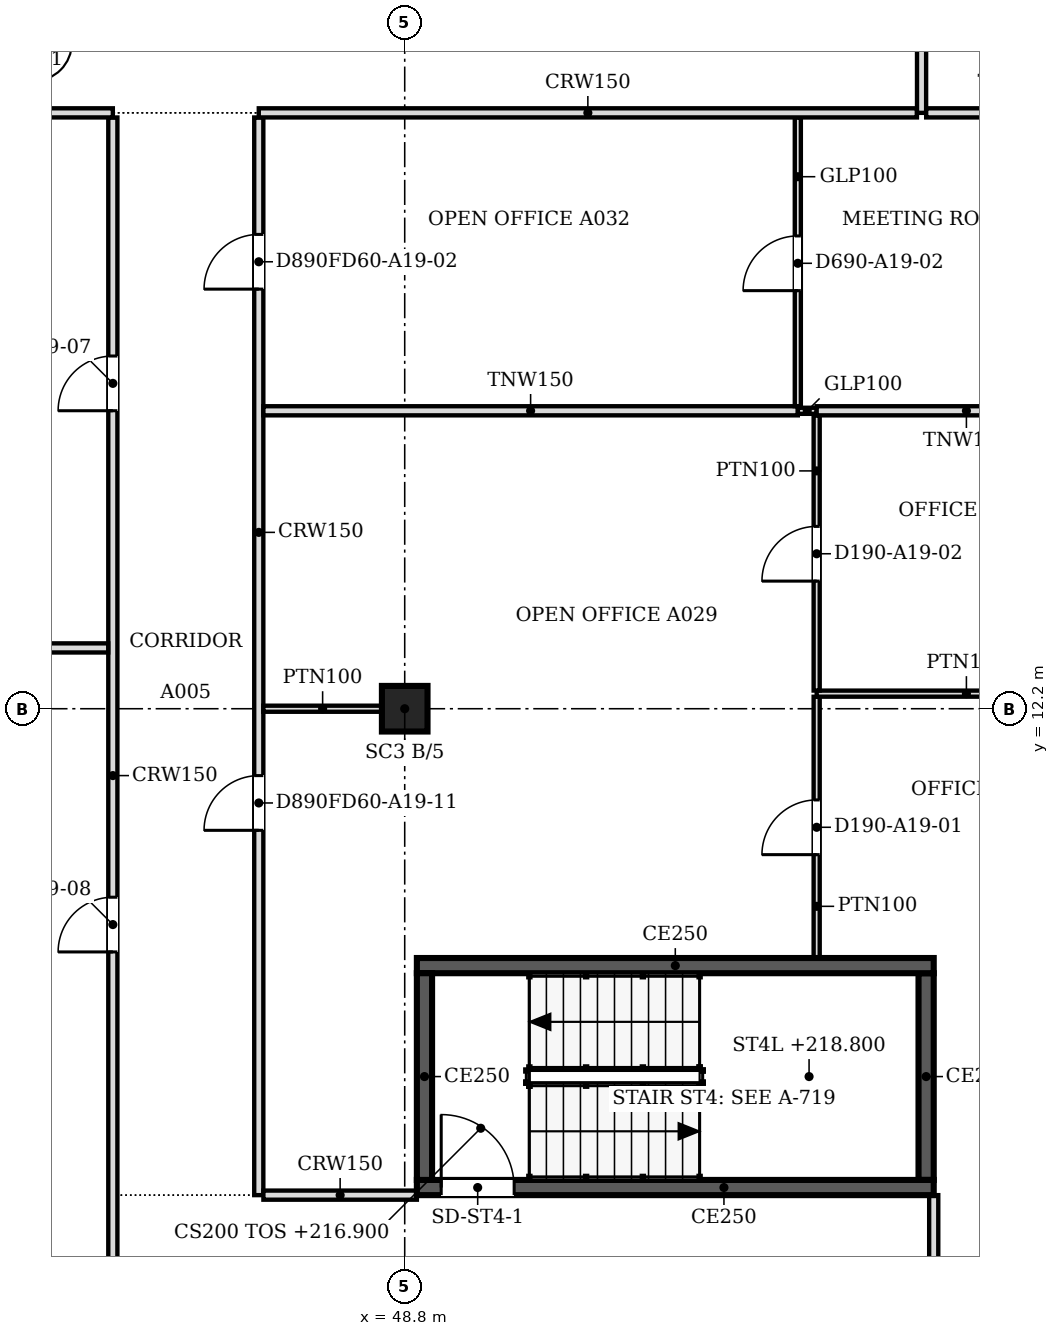
"""IFC4 building model, lengths in metres.
Left out: names, types, materials, properties, quantities, classifications, styles, units other than length and angle.
Written with IfcOpenShell. Run it as: python <this file> out.ifc"""

import sys

from ifc_helpers import new_model, si_unit, direction, frame, frame_2d, origin, origin_2d, place, context, subcontext, project, spatial, polyline, rectangle, outline, extrude, faceted_brep, source, transform, mapped, element, fill, save


model = new_model("IFC4")
c1 = context("Model", 3, precision=1e-05, world=origin(), true_north=direction((0.0, 1.0)))
c2 = subcontext(c1, "Body", "Model", "MODEL_VIEW")
j1 = project(units=[si_unit("LENGTHUNIT", "METRE"), si_unit("PLANEANGLEUNIT", "RADIAN")], contexts=[c1])
p1 = place(None, origin())
s1 = spatial("IfcSite", under=j1, at=p1, CompositionType="ELEMENT")
p2 = place(p1, origin())
s2 = spatial("IfcBuilding", under=s1, at=p2, CompositionType="ELEMENT")
p3 = place(p2, frame((0.0, 0.0, 216.9)))
s3 = spatial("IfcBuildingStorey", under=s2, at=p3, CompositionType="ELEMENT", Elevation=216.9)
p4 = place(p3, frame((48.8, 12.2, 0.0), z_axis=(0.0, 0.0, 1.0), x_axis=(1.0, 0.0, 0.0)))
e1 = element("IfcColumn", 1, at=p4, inside=s3, PredefinedType="COLUMN", context=c2, shape_type="SweptSolid", body=[
    extrude(rectangle(XDim=0.75, YDim=0.75, at=origin_2d()), origin(), (0.0, 0.0, 1.0), 3.6),
])
m1 = source(origin(), c2, "Body", "Brep", [
    faceted_brep([(0.053, -0.25, 0.0), (2.997, -0.25, 3.8), (0.053, -0.25, 7.6), (0.0, -0.25, 7.532), (0.0, -0.25, 0.068), (0.106, 0.25, 7.531), (2.944, 0.25, 3.868), (2.944, 0.25, 3.732), (0.106, 0.25, 0.068), (2.997, 0.0, 3.8), (0.053, 0.0, 0.0), (0.053, 0.0, 7.6)], [[[0, 1, 2, 3, 4]], [[5, 6, 7, 8]], [[8, 7, 9, 1, 0, 10]], [[6, 5, 11, 2, 1, 9]], [[3, 2, 11]], [[10, 0, 4]], [[8, 10, 4, 3, 11, 5]], [[9, 7, 6]]]),
])
p5 = place(p3, frame((57.569, 1.274, -3.8), z_axis=(0.0, 0.0, 1.0), x_axis=(0.707066050402, 0.707147509625, 0.0)))
e2 = element("IfcWall", 2, at=p5, inside=s3, PredefinedType="SOLIDWALL", context=c2, shape_type="MappedRepresentation", body=[
    mapped(m1, transform((0.0, 0.0, 0.0), scale=1.0)),
])
m2 = source(origin(), c2, "Body", "SweptSolid", [
    extrude(outline(polyline([(0.253, 0.666), (2.681, 3.8), (0.253, 6.934), (0.253, 0.666)])), frame((0.0, 0.26, 0.0), z_axis=(0.0, -1.0, 0.0), x_axis=(1.0, 0.0, 0.0)), (0.0, 0.0, 1.0), 0.52),
])
p6 = place(p5, origin())
e3 = element("IfcOpeningElement", 3, at=p6, cuts=e2, PredefinedType="OPENING", context=c2, shape_type="MappedRepresentation", body=[
    mapped(m2, transform((0.0, 0.0, 0.0), scale=1.0)),
])
p7 = place(p2, frame((0.0, 0.0, 220.7)))
s4 = spatial("IfcBuildingStorey", under=s2, at=p7, CompositionType="ELEMENT", Elevation=220.7)
m3 = source(origin(), c2, "Body", "Brep", [
    faceted_brep([(2.944, -0.25, 0.0), (2.997, -0.25, 0.068), (2.997, -0.25, 7.532), (2.944, -0.25, 7.6), (0.0, -0.25, 3.8), (0.053, 0.25, 3.868), (2.891, 0.25, 7.532), (2.891, 0.25, 0.068), (0.053, 0.25, 3.732), (2.944, 0.0, 0.0), (2.944, 0.0, 7.6), (0.0, 0.0, 3.8)], [[[0, 1, 2, 3, 4]], [[5, 6, 7, 8]], [[1, 0, 9]], [[10, 3, 2]], [[6, 5, 11, 4, 3, 10]], [[8, 7, 9, 0, 4, 11]], [[8, 11, 5]], [[1, 9, 7, 6, 10, 2]]]),
])
p8 = place(p7, frame((57.606, 1.312, -3.8), z_axis=(0.0, 0.0, 1.0), x_axis=(0.707147509625, 0.707066050402, 0.0)))
e4 = element("IfcWall", 4, at=p8, inside=s4, PredefinedType="SOLIDWALL", context=c2, shape_type="MappedRepresentation", body=[
    mapped(m3, transform((0.0, 0.0, 0.0), scale=1.0)),
])
m4 = source(origin(), c2, "Body", "SweptSolid", [
    extrude(outline(polyline([(2.744, 6.934), (0.316, 3.8), (2.744, 0.667), (2.744, 6.934)])), frame((0.0, 0.26, 0.0), z_axis=(0.0, -1.0, 0.0), x_axis=(1.0, 0.0, 0.0)), (0.0, 0.0, 1.0), 0.52),
])
p9 = place(p8, origin())
e5 = element("IfcOpeningElement", 5, at=p9, cuts=e4, PredefinedType="OPENING", context=c2, shape_type="MappedRepresentation", body=[
    mapped(m4, transform((0.0, 0.0, 0.0), scale=1.0)),
])
p10 = place(p3, frame((57.5, 4.325, 0.0), z_axis=(0.0, 0.0, 1.0), x_axis=(-1.0, 0.0, 0.0)))
e6 = element("IfcWall", 6, at=p10, inside=s3, PredefinedType="SOLIDWALL", context=c2, shape_type="SweptSolid", body=[
    extrude(rectangle(XDim=8.5, YDim=0.25, at=frame_2d((4.25, 0.0))), origin(), (0.0, 0.0, 1.0), 3.8),
])
m5 = source(origin(), c2, "Body", "SweptSolid", [
    extrude(rectangle(XDim=1.2, YDim=2.1, at=frame_2d((0.6, 1.05))), frame((0.0, 0.135, 0.0), z_axis=(0.0, -1.0, 0.0), x_axis=(1.0, 0.0, 0.0)), (0.0, 0.0, 1.0), 0.27),
])
p11 = place(p10, frame((6.9, 0.0, 0.0)))
e7 = element("IfcOpeningElement", 7, at=p11, cuts=e6, PredefinedType="OPENING", context=c2, shape_type="MappedRepresentation", body=[
    mapped(m5, transform((0.0, 0.0, 0.0), scale=1.0)),
])
p12 = place(p3, frame((49.125, 4.45, 0.0), z_axis=(0.0, 0.0, 1.0), x_axis=(0.0, 1.0, 0.0)))
e8 = element("IfcWall", 8, at=p12, inside=s3, PredefinedType="SOLIDWALL", context=c2, shape_type="SweptSolid", body=[
    extrude(rectangle(XDim=3.4, YDim=0.25, at=frame_2d((1.7, 0.0))), origin(), (0.0, 0.0, 1.0), 3.8),
])
p13 = place(p3, frame((49.0, 7.975, 0.0), z_axis=(0.0, 0.0, 1.0), x_axis=(1.0, 0.0, 0.0)))
e9 = element("IfcWall", 9, at=p13, inside=s3, PredefinedType="SOLIDWALL", context=c2, shape_type="SweptSolid", body=[
    extrude(rectangle(XDim=8.5, YDim=0.25, at=frame_2d((4.25, 0.0))), origin(), (0.0, 0.0, 1.0), 3.8),
])
p14 = place(p3, frame((57.375, 7.85, 0.0), z_axis=(0.0, 0.0, 1.0), x_axis=(0.0, -1.0, 0.0)))
e10 = element("IfcWall", 10, at=p14, inside=s3, PredefinedType="SOLIDWALL", context=c2, shape_type="SweptSolid", body=[
    extrude(rectangle(XDim=3.4, YDim=0.25, at=frame_2d((1.7, 0.0))), origin(), (0.0, 0.0, 1.0), 3.8),
])
p15 = place(p3, frame((44.0, 0.5, 0.0), z_axis=(0.0, 0.0, 1.0), x_axis=(0.0, 1.0, 0.0)))
e11 = element("IfcWall", 11, at=p15, inside=s3, PredefinedType="PARTITIONING", context=c2, shape_type="SweptSolid", body=[
    extrude(rectangle(XDim=21.424, YDim=0.15, at=frame_2d((10.712, 0.0))), origin(), (0.0, 0.0, 1.0), 3.067),
])
m6 = source(origin(), c2, "Body", "SweptSolid", [
    extrude(rectangle(XDim=0.9, YDim=2.1, at=frame_2d((0.45, 1.05))), frame((0.0, 0.085, 0.0), z_axis=(0.0, -1.0, 0.0), x_axis=(1.0, 0.0, 0.0)), (0.0, 0.0, 1.0), 0.17),
])
p16 = place(p15, frame((16.601, 0.0, 0.0)))
e12 = element("IfcOpeningElement", 12, at=p16, cuts=e11, PredefinedType="OPENING", context=c2, shape_type="MappedRepresentation", body=[
    mapped(m6, transform((0.0, 0.0, 0.0), scale=1.0)),
])
p17 = place(p15, frame((7.7, 0.0, 0.0)))
e13 = element("IfcOpeningElement", 13, at=p17, cuts=e11, PredefinedType="OPENING", context=c2, shape_type="MappedRepresentation", body=[
    mapped(m6, transform((0.0, 0.0, 0.0), scale=1.0)),
])
p18 = place(p3, frame((57.5, 1.559, 0.0), z_axis=(0.0, 0.0, 1.0), x_axis=(0.0, 1.0, 0.0)))
e14 = element("IfcWall", 14, at=p18, inside=s3, PredefinedType="PARTITIONING", context=c2, shape_type="SweptSolid", body=[
    extrude(rectangle(XDim=2.641, YDim=0.15, at=frame_2d((1.32, 0.0))), origin(), (0.0, 0.0, 1.0), 3.067),
])
p19 = place(p3, frame((46.4, 21.924, 0.0), z_axis=(0.0, 0.0, 1.0), x_axis=(0.0, -1.0, 0.0)))
e15 = element("IfcWall", 15, at=p19, inside=s3, PredefinedType="PARTITIONING", context=c2, shape_type="SweptSolid", body=[
    extrude(rectangle(XDim=17.724, YDim=0.15, at=frame_2d((8.862, 0.0))), origin(), (0.0, 0.0, 1.0), 3.067),
])
p20 = place(p19, frame((1.923, 0.0, 0.0)))
e16 = element("IfcOpeningElement", 16, at=p20, cuts=e15, PredefinedType="OPENING", context=c2, shape_type="MappedRepresentation", body=[
    mapped(m6, transform((0.0, 0.0, 0.0), scale=1.0)),
])
p21 = place(p19, frame((10.824, 0.0, 0.0)))
e17 = element("IfcOpeningElement", 17, at=p21, cuts=e15, PredefinedType="OPENING", context=c2, shape_type="MappedRepresentation", body=[
    mapped(m6, transform((0.0, 0.0, 0.0), scale=1.0)),
])
p22 = place(p3, frame((46.476, 4.2, 0.0), z_axis=(0.0, 0.0, 1.0), x_axis=(1.0, 0.0, 0.0)))
e18 = element("IfcWall", 18, at=p22, inside=s3, PredefinedType="PARTITIONING", context=c2, shape_type="SweptSolid", body=[
    extrude(rectangle(XDim=2.524, YDim=0.15, at=frame_2d((1.262, 0.0))), origin(), (0.0, 0.0, 1.0), 3.067),
])
p23 = place(p3, frame((55.575, 12.397, 0.0), z_axis=(0.0, 0.0, 1.0), x_axis=(0.0, -1.0, 0.0)))
e19 = element("IfcWall", 19, at=p23, inside=s3, PredefinedType="PARTITIONING", context=c2, shape_type="SweptSolid", body=[
    extrude(rectangle(XDim=4.297, YDim=0.1, at=frame_2d((2.148, 0.0))), origin(), (0.0, 0.0, 1.0), 3.067),
])
m7 = source(origin(), c2, "Body", "SweptSolid", [
    extrude(rectangle(XDim=0.9, YDim=2.1, at=frame_2d((0.45, 1.05))), frame((0.0, 0.06, 0.0), z_axis=(0.0, -1.0, 0.0), x_axis=(1.0, 0.0, 0.0)), (0.0, 0.0, 1.0), 0.12),
])
p24 = place(p23, frame((1.697, 0.0, 0.0)))
e20 = element("IfcOpeningElement", 20, at=p24, cuts=e19, PredefinedType="OPENING", context=c2, shape_type="MappedRepresentation", body=[
    mapped(m7, transform((0.0, 0.0, 0.0), scale=1.0)),
])
p25 = place(p3, frame((48.425, 12.2, 0.0), z_axis=(0.0, 0.0, 1.0), x_axis=(-1.0, 0.0, 0.0)))
e21 = element("IfcWall", 21, at=p25, inside=s3, PredefinedType="PARTITIONING", context=c2, shape_type="SweptSolid", body=[
    extrude(rectangle(XDim=1.95, YDim=0.1, at=frame_2d((0.975, 0.0))), origin(), (0.0, 0.0, 1.0), 3.067),
])
p26 = place(p3, frame((55.575, 12.448, 0.0), z_axis=(0.0, 0.0, 1.0), x_axis=(1.0, 0.0, 0.0)))
e22 = element("IfcWall", 22, at=p26, inside=s3, PredefinedType="PARTITIONING", context=c2, shape_type="SweptSolid", body=[
    extrude(rectangle(XDim=4.925, YDim=0.1, at=frame_2d((2.462, 0.0))), origin(), (0.0, 0.0, 1.0), 3.067),
])
p27 = place(p3, frame((55.575, 17.024, 0.0), z_axis=(0.0, 0.0, 1.0), x_axis=(0.0, -1.0, 0.0)))
e23 = element("IfcWall", 23, at=p27, inside=s3, PredefinedType="PARTITIONING", context=c2, shape_type="SweptSolid", body=[
    extrude(rectangle(XDim=4.525, YDim=0.1, at=frame_2d((2.263, 0.0))), origin(), (0.0, 0.0, 1.0), 3.067),
])
p28 = place(p27, frame((1.825, 0.0, 0.0)))
e24 = element("IfcOpeningElement", 24, at=p28, cuts=e23, PredefinedType="OPENING", context=c2, shape_type="MappedRepresentation", body=[
    mapped(m7, transform((0.0, 0.0, 0.0), scale=1.0)),
])
p29 = place(p3, frame((27.575, 13.2, 0.0), z_axis=(0.0, 0.0, 1.0), x_axis=(1.0, 0.0, 0.0)))
e25 = element("IfcWall", 25, at=p29, inside=s3, PredefinedType="PARTITIONING", context=c2, shape_type="SweptSolid", body=[
    extrude(rectangle(XDim=16.349, YDim=0.15, at=frame_2d((8.175, 0.0))), origin(), (0.0, 0.0, 1.0), 3.067),
])
p30 = place(p3, frame((46.476, 17.1, 0.0), z_axis=(0.0, 0.0, 1.0), x_axis=(1.0, 0.0, 0.0)))
e26 = element("IfcWall", 26, at=p30, inside=s3, PredefinedType="PARTITIONING", context=c2, shape_type="SweptSolid", body=[
    extrude(rectangle(XDim=8.789, YDim=0.15, at=frame_2d((4.395, 0.0))), origin(), (0.0, 0.0, 1.0), 3.067),
])
p31 = place(p3, frame((55.266, 17.1, 0.0), z_axis=(0.0, 0.0, 1.0), x_axis=(1.0, 0.0, 0.0)))
e27 = element("IfcWall", 27, at=p31, inside=s3, PredefinedType="PARTITIONING", context=c2, shape_type="SweptSolid", body=[
    extrude(rectangle(XDim=0.308, YDim=0.1, at=frame_2d((0.154, 0.0))), origin(), (0.0, 0.0, 1.0), 3.067),
])
p32 = place(p3, frame((55.575, 17.1, 0.0), z_axis=(0.0, 0.0, 1.0), x_axis=(1.0, 0.0, 0.0)))
e28 = element("IfcWall", 28, at=p32, inside=s3, PredefinedType="PARTITIONING", context=c2, shape_type="SweptSolid", body=[
    extrude(rectangle(XDim=4.925, YDim=0.15, at=frame_2d((2.462, 0.0))), origin(), (0.0, 0.0, 1.0), 3.067),
])
p33 = place(p3, frame((55.265, 21.924, 0.0), z_axis=(0.0, 0.0, 1.0), x_axis=(0.0, -1.0, 0.0)))
e29 = element("IfcWall", 29, at=p33, inside=s3, PredefinedType="PARTITIONING", context=c2, shape_type="SweptSolid", body=[
    extrude(rectangle(XDim=4.748, YDim=0.1, at=frame_2d((2.374, 0.0))), origin(), (0.0, 0.0, 1.0), 3.067),
])
p34 = place(p33, frame((1.948, 0.0, 0.0)))
e30 = element("IfcOpeningElement", 30, at=p34, cuts=e29, PredefinedType="OPENING", context=c2, shape_type="MappedRepresentation", body=[
    mapped(m7, transform((0.0, 0.0, 0.0), scale=1.0)),
])
p35 = place(p3, frame((30.5, 22.0, 0.0), z_axis=(0.0, 0.0, 1.0), x_axis=(1.0, 0.0, 0.0)))
e31 = element("IfcWall", 31, at=p35, inside=s3, PredefinedType="PARTITIONING", context=c2, shape_type="SweptSolid", body=[
    extrude(rectangle(XDim=13.5, YDim=0.15, at=frame_2d((6.75, 0.0))), origin(), (0.0, 0.0, 1.0), 3.067),
])
p36 = place(p3, frame((46.4, 22.0, 0.0), z_axis=(0.0, 0.0, 1.0), x_axis=(1.0, 0.0, 0.0)))
e32 = element("IfcWall", 32, at=p36, inside=s3, PredefinedType="PARTITIONING", context=c2, shape_type="SweptSolid", body=[
    extrude(rectangle(XDim=10.824, YDim=0.15, at=frame_2d((5.412, 0.0))), origin(), (0.0, 0.0, 1.0), 3.067),
])
p37 = place(p3, frame((57.3, 30.6, 0.0), z_axis=(0.0, 0.0, 1.0), x_axis=(0.0, -1.0, 0.0)))
e33 = element("IfcWall", 33, at=p37, inside=s3, PredefinedType="PARTITIONING", context=c2, shape_type="SweptSolid", body=[
    extrude(rectangle(XDim=8.6, YDim=0.15, at=frame_2d((4.3, 0.0))), origin(), (0.0, 0.0, 1.0), 3.067),
])
p38 = place(p37, frame((3.9, 0.0, 0.0)))
e34 = element("IfcOpeningElement", 34, at=p38, cuts=e33, PredefinedType="OPENING", context=c2, shape_type="MappedRepresentation", body=[
    mapped(m6, transform((0.0, 0.0, 0.0), scale=1.0)),
])
p39 = place(p3, frame((57.376, 22.0, 0.0), z_axis=(0.0, 0.0, 1.0), x_axis=(1.0, 0.0, 0.0)))
e35 = element("IfcWall", 35, at=p39, inside=s3, PredefinedType="PARTITIONING", context=c2, shape_type="SweptSolid", body=[
    extrude(rectangle(XDim=3.124, YDim=0.15, at=frame_2d((1.562, 0.0))), origin(), (0.0, 0.0, 1.0), 3.067),
])
m8 = source(origin(), c2, "Body", "SweptSolid", [
    extrude(rectangle(XDim=1.2, YDim=2.1, at=frame_2d((0.6, 1.05))), frame((0.0, 0.025, 0.0), z_axis=(0.0, -1.0, 0.0), x_axis=(1.0, 0.0, 0.0)), (0.0, 0.0, 1.0), 0.05),
])
p40 = place(p11, origin())
e36 = element("IfcDoor", 36, at=p40, inside=s3, OperationType="SINGLE_SWING_RIGHT", PredefinedType="DOOR", context=c2, shape_type="MappedRepresentation", body=[
    mapped(m8, transform((0.0, 0.0, 0.0), scale=1.0)),
])
fill(e7, e36)
m9 = source(origin(), c2, "Body", "SweptSolid", [
    extrude(rectangle(XDim=0.9, YDim=2.1, at=frame_2d((0.45, 1.05))), frame((0.0, 0.025, 0.0), z_axis=(0.0, -1.0, 0.0), x_axis=(1.0, 0.0, 0.0)), (0.0, 0.0, 1.0), 0.05),
])
p41 = place(p24, origin())
e37 = element("IfcDoor", 37, at=p41, inside=s3, OperationType="SINGLE_SWING_RIGHT", PredefinedType="DOOR", context=c2, shape_type="MappedRepresentation", body=[
    mapped(m9, transform((0.0, 0.0, 0.0), scale=1.0)),
])
fill(e20, e37)
p42 = place(p28, origin())
e38 = element("IfcDoor", 38, at=p42, inside=s3, OperationType="SINGLE_SWING_RIGHT", PredefinedType="DOOR", context=c2, shape_type="MappedRepresentation", body=[
    mapped(m9, transform((0.0, 0.0, 0.0), scale=1.0)),
])
fill(e24, e38)
p43 = place(p34, origin())
e39 = element("IfcDoor", 39, at=p43, inside=s3, OperationType="SINGLE_SWING_RIGHT", PredefinedType="DOOR", context=c2, shape_type="MappedRepresentation", body=[
    mapped(m9, transform((0.0, 0.0, 0.0), scale=1.0)),
])
fill(e30, e39)
p44 = place(p20, origin())
e40 = element("IfcDoor", 40, at=p44, inside=s3, OperationType="SINGLE_SWING_RIGHT", PredefinedType="DOOR", context=c2, shape_type="MappedRepresentation", body=[
    mapped(m9, transform((0.0, 0.0, 0.0), scale=1.0)),
])
fill(e16, e40)
p45 = place(p16, origin())
e41 = element("IfcDoor", 41, at=p45, inside=s3, OperationType="SINGLE_SWING_LEFT", PredefinedType="DOOR", context=c2, shape_type="MappedRepresentation", body=[
    mapped(m9, transform((0.0, 0.0, 0.0), scale=1.0)),
])
fill(e12, e41)
p46 = place(p17, origin())
e42 = element("IfcDoor", 42, at=p46, inside=s3, OperationType="SINGLE_SWING_LEFT", PredefinedType="DOOR", context=c2, shape_type="MappedRepresentation", body=[
    mapped(m9, transform((0.0, 0.0, 0.0), scale=1.0)),
])
fill(e13, e42)
p47 = place(p21, origin())
e43 = element("IfcDoor", 43, at=p47, inside=s3, OperationType="SINGLE_SWING_RIGHT", PredefinedType="DOOR", context=c2, shape_type="MappedRepresentation", body=[
    mapped(m9, transform((0.0, 0.0, 0.0), scale=1.0)),
])
fill(e17, e43)
save(model, sys.argv[1])
